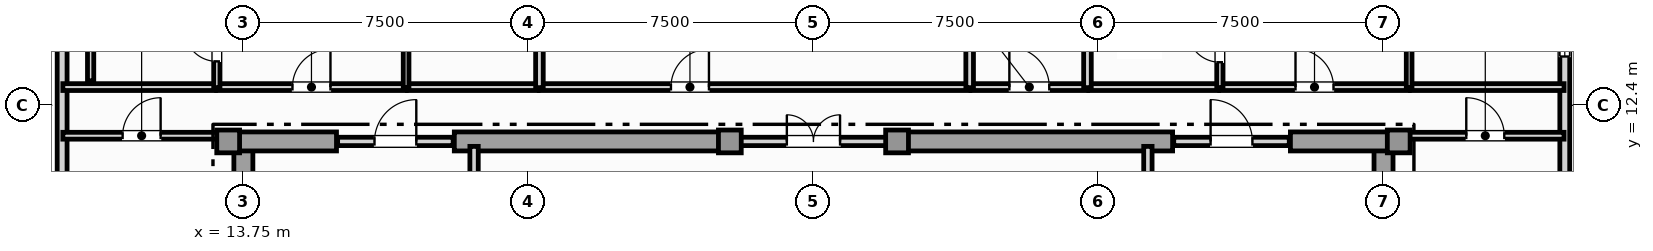
"""IFC4 building model, lengths in metres.
Left out: names, types, materials, properties, quantities, classifications, styles, units other than length and angle.
Written with IfcOpenShell. Run it as: python <this file> out.ifc"""

import sys

from ifc_helpers import new_model, si_unit, direction, frame, frame_2d, origin, origin_2d, place, context, subcontext, project, spatial, rectangle, extrude, element, fill, save


model = new_model("IFC4")
c1 = context("Model", 3, precision=1e-05, world=origin(), true_north=direction((0.0, 1.0)))
c2 = subcontext(c1, "Body", "Model", "MODEL_VIEW")
j1 = project(units=[si_unit("LENGTHUNIT", "METRE"), si_unit("PLANEANGLEUNIT", "RADIAN")], contexts=[c1])
p1 = place(None, origin())
s1 = spatial("IfcSite", under=j1, at=p1, CompositionType="ELEMENT")
p2 = place(p1, origin())
s2 = spatial("IfcBuilding", under=s1, at=p2, CompositionType="ELEMENT")
p3 = place(p2, frame((0.0, 0.0, 308.0)))
s3 = spatial("IfcBuildingStorey", under=s2, at=p3, CompositionType="ELEMENT", Elevation=308.0)
for number, where, z_axis, x_axis in (
    (1, (13.75, 0.92, 0.0), (0.0, 0.0, 1.0), (0.0, 1.0, 0.0)),
    (2, (43.75, 0.92, 0.0), (0.0, 0.0, 1.0), (0.0, 1.0, 0.0)),
):
    element("IfcWall", number, at=place(p3, frame(where, z_axis=z_axis, x_axis=x_axis)), inside=s3, PredefinedType="SHEAR", context=c2, shape_type="SweptSolid", body=[
        extrude(rectangle(XDim=10.53, YDim=0.5, at=frame_2d((5.265, 0.0))), origin(), (0.0, 0.0, 1.0), 4.85),
    ])
p4 = place(p3, frame((13.25, 11.45, 0.0), z_axis=(0.0, 0.0, 1.0), x_axis=(1.0, 0.0, 0.0)))
e3 = element("IfcWall", 3, at=p4, inside=s3, PredefinedType="SHEAR", context=c2, shape_type="SweptSolid", body=[
    extrude(rectangle(XDim=2.95, YDim=0.5, at=frame_2d((1.475, 0.0))), origin(), (0.0, 0.0, 1.0), 4.85),
])
for number, where, z_axis, x_axis in (
    (4, (19.3, 11.45, 0.0), (0.0, 0.0, 1.0), (1.0, 0.0, 0.0)),
    (5, (30.9, 11.45, 0.0), (0.0, 0.0, 1.0), (1.0, 0.0, 0.0)),
):
    element("IfcWall", number, at=place(p3, frame(where, z_axis=z_axis, x_axis=x_axis)), inside=s3, PredefinedType="SHEAR", context=c2, shape_type="SweptSolid", body=[
        extrude(rectangle(XDim=7.3, YDim=0.5, at=frame_2d((3.65, 0.0))), origin(), (0.0, 0.0, 1.0), 4.85),
    ])
p5 = place(p3, frame((41.3, 11.45, 0.0), z_axis=(0.0, 0.0, 1.0), x_axis=(1.0, 0.0, 0.0)))
e6 = element("IfcWall", 6, at=p5, inside=s3, PredefinedType="SHEAR", context=c2, shape_type="SweptSolid", body=[
    extrude(rectangle(XDim=2.95, YDim=0.5, at=frame_2d((1.475, 0.0))), origin(), (0.0, 0.0, 1.0), 4.85),
])
for number, where, z_axis, x_axis in (
    (7, (13.35, 11.45, 0.0), (0.0, 0.0, 1.0), (1.0, 0.0, 0.0)),
    (8, (44.15, 11.45, 0.0), (0.0, 0.0, 1.0), (1.0, 0.0, 0.0)),
    (9, (26.55, 11.45, 0.0), (0.0, 0.0, 1.0), (1.0, 0.0, 0.0)),
    (10, (30.95, 11.45, 0.0), (0.0, 0.0, 1.0), (1.0, 0.0, 0.0)),
):
    element("IfcColumn", number, at=place(p3, frame(where, z_axis=z_axis, x_axis=x_axis)), inside=s3, PredefinedType="COLUMN", context=c2, shape_type="SweptSolid", body=[
        extrude(rectangle(XDim=0.6, YDim=0.6, at=origin_2d()), origin(), (0.0, 0.0, 1.0), 5.05),
    ])
p6 = place(p3, frame((48.519, 3.24, 0.0), z_axis=(0.0, 0.0, 1.0), x_axis=(0.0, 1.0, 0.0)))
e11 = element("IfcWall", 11, at=p6, inside=s3, PredefinedType="SOLIDWALL", context=c2, shape_type="SweptSolid", body=[
    extrude(rectangle(XDim=26.813, YDim=0.26, at=frame_2d((13.406, 0.0))), origin(), (0.0, 0.0, 1.0), 4.85),
])
p7 = place(p6, frame((24.06, 0.0, 0.95)))
e12 = element("IfcOpeningElement", 12, at=p7, cuts=e11, PredefinedType="OPENING", context=c2, shape_type="SweptSolid", body=[
    extrude(rectangle(XDim=0.9, YDim=1.5, at=frame_2d((0.45, 0.75))), frame((0.0, 0.14, 0.0), z_axis=(0.0, -1.0, 0.0), x_axis=(1.0, 0.0, 0.0)), (0.0, 0.0, 1.0), 0.28),
])
p8 = place(p6, frame((10.445, 0.0, 0.9)))
e13 = element("IfcOpeningElement", 13, at=p8, cuts=e11, PredefinedType="OPENING", context=c2, shape_type="SweptSolid", body=[
    extrude(rectangle(XDim=1.5, YDim=1.95, at=frame_2d((0.75, 0.975))), frame((0.0, 0.14, 0.0), z_axis=(0.0, -1.0, 0.0), x_axis=(1.0, 0.0, 0.0)), (0.0, 0.0, 1.0), 0.28),
])
p9 = place(p6, frame((17.51, 0.0, 0.9)))
e14 = element("IfcOpeningElement", 14, at=p9, cuts=e11, PredefinedType="OPENING", context=c2, shape_type="SweptSolid", body=[
    extrude(rectangle(XDim=1.5, YDim=1.95, at=frame_2d((0.75, 0.975))), frame((0.0, 0.14, 0.0), z_axis=(0.0, -1.0, 0.0), x_axis=(1.0, 0.0, 0.0)), (0.0, 0.0, 1.0), 0.28),
])
p10 = place(p3, frame((8.981, 30.053, 0.0), z_axis=(0.0, 0.0, 1.0), x_axis=(0.0, -1.0, 0.0)))
e15 = element("IfcWall", 15, at=p10, inside=s3, PredefinedType="SOLIDWALL", context=c2, shape_type="SweptSolid", body=[
    extrude(rectangle(XDim=26.813, YDim=0.26, at=frame_2d((13.406, 0.0))), origin(), (0.0, 0.0, 1.0), 4.85),
])
p11 = place(p10, frame((20.763, 0.0, 0.85)))
e16 = element("IfcOpeningElement", 16, at=p11, cuts=e15, PredefinedType="OPENING", context=c2, shape_type="SweptSolid", body=[
    extrude(rectangle(XDim=2.4, YDim=2.0, at=frame_2d((1.2, 1.0))), frame((0.0, 0.14, 0.0), z_axis=(0.0, -1.0, 0.0), x_axis=(1.0, 0.0, 0.0)), (0.0, 0.0, 1.0), 0.28),
])
p12 = place(p10, frame((1.853, 0.0, 0.95)))
e17 = element("IfcOpeningElement", 17, at=p12, cuts=e15, PredefinedType="OPENING", context=c2, shape_type="SweptSolid", body=[
    extrude(rectangle(XDim=0.9, YDim=1.5, at=frame_2d((0.45, 0.75))), frame((0.0, 0.14, 0.0), z_axis=(0.0, -1.0, 0.0), x_axis=(1.0, 0.0, 0.0)), (0.0, 0.0, 1.0), 0.28),
])
p13 = place(p10, frame((12.001, 0.0, 0.9)))
e18 = element("IfcOpeningElement", 18, at=p13, cuts=e15, PredefinedType="OPENING", context=c2, shape_type="SweptSolid", body=[
    extrude(rectangle(XDim=1.5, YDim=1.95, at=frame_2d((0.75, 0.975))), frame((0.0, 0.14, 0.0), z_axis=(0.0, -1.0, 0.0), x_axis=(1.0, 0.0, 0.0)), (0.0, 0.0, 1.0), 0.28),
])
p14 = place(p10, frame((6.048, 0.0, 0.9)))
e19 = element("IfcOpeningElement", 19, at=p14, cuts=e15, PredefinedType="OPENING", context=c2, shape_type="SweptSolid", body=[
    extrude(rectangle(XDim=1.5, YDim=1.95, at=frame_2d((0.75, 0.975))), frame((0.0, 0.14, 0.0), z_axis=(0.0, -1.0, 0.0), x_axis=(1.0, 0.0, 0.0)), (0.0, 0.0, 1.0), 0.28),
])
p15 = place(p3, frame((19.82, 8.52, 0.0), z_axis=(0.0, 0.0, 1.0), x_axis=(0.0, 1.0, 0.0)))
e20 = element("IfcWall", 20, at=p15, inside=s3, PredefinedType="SOLIDWALL", context=c2, shape_type="SweptSolid", body=[
    extrude(rectangle(XDim=2.8, YDim=0.22, at=frame_2d((1.4, 0.0))), origin(), (0.0, 0.0, 1.0), 4.305),
])
p16 = place(p15, frame((0.85, 0.0, 0.0)))
e21 = element("IfcOpeningElement", 21, at=p16, cuts=e20, PredefinedType="OPENING", context=c2, shape_type="SweptSolid", body=[
    extrude(rectangle(XDim=1.1, YDim=2.2, at=frame_2d((0.55, 1.1))), frame((0.0, 0.12, 0.0), z_axis=(0.0, -1.0, 0.0), x_axis=(1.0, 0.0, 0.0)), (0.0, 0.0, 1.0), 0.24),
])
p17 = place(p3, frame((37.55, 8.52, 0.0), z_axis=(0.0, 0.0, 1.0), x_axis=(0.0, 1.0, 0.0)))
e22 = element("IfcWall", 22, at=p17, inside=s3, PredefinedType="SOLIDWALL", context=c2, shape_type="SweptSolid", body=[
    extrude(rectangle(XDim=2.8, YDim=0.22, at=frame_2d((1.4, 0.0))), origin(), (0.0, 0.0, 1.0), 4.305),
])
p18 = place(p17, frame((0.85, 0.0, 0.0)))
e23 = element("IfcOpeningElement", 23, at=p18, cuts=e22, PredefinedType="OPENING", context=c2, shape_type="SweptSolid", body=[
    extrude(rectangle(XDim=1.1, YDim=2.2, at=frame_2d((0.55, 1.1))), frame((0.0, 0.12, 0.0), z_axis=(0.0, -1.0, 0.0), x_axis=(1.0, 0.0, 0.0)), (0.0, 0.0, 1.0), 0.24),
])
p19 = place(p3, frame((16.23, 11.45, 0.0), z_axis=(0.0, 0.0, 1.0), x_axis=(1.0, 0.0, 0.0)))
e24 = element("IfcWall", 24, at=p19, inside=s3, PredefinedType="SOLIDWALL", context=c2, shape_type="SweptSolid", body=[
    extrude(rectangle(XDim=3.04, YDim=0.22, at=frame_2d((1.52, 0.0))), origin(), (0.0, 0.0, 1.0), 4.85),
])
p20 = place(p19, frame((0.97, 0.0, 0.0)))
e25 = element("IfcOpeningElement", 25, at=p20, cuts=e24, PredefinedType="OPENING", context=c2, shape_type="SweptSolid", body=[
    extrude(rectangle(XDim=1.1, YDim=2.2, at=frame_2d((0.55, 1.1))), frame((0.0, 0.12, 0.0), z_axis=(0.0, -1.0, 0.0), x_axis=(1.0, 0.0, 0.0)), (0.0, 0.0, 1.0), 0.24),
])
p21 = place(p3, frame((26.63, 11.45, 0.0), z_axis=(0.0, 0.0, 1.0), x_axis=(1.0, 0.0, 0.0)))
e26 = element("IfcWall", 26, at=p21, inside=s3, PredefinedType="SOLIDWALL", context=c2, shape_type="SweptSolid", body=[
    extrude(rectangle(XDim=4.24, YDim=0.22, at=frame_2d((2.12, 0.0))), origin(), (0.0, 0.0, 1.0), 4.85),
])
p22 = place(p21, frame((1.42, 0.0, 0.0)))
e27 = element("IfcOpeningElement", 27, at=p22, cuts=e26, PredefinedType="OPENING", context=c2, shape_type="SweptSolid", body=[
    extrude(rectangle(XDim=1.4, YDim=2.2, at=frame_2d((0.7, 1.1))), frame((0.0, 0.12, 0.0), z_axis=(0.0, -1.0, 0.0), x_axis=(1.0, 0.0, 0.0)), (0.0, 0.0, 1.0), 0.24),
])
p23 = place(p3, frame((38.23, 11.45, 0.0), z_axis=(0.0, 0.0, 1.0), x_axis=(1.0, 0.0, 0.0)))
e28 = element("IfcWall", 28, at=p23, inside=s3, PredefinedType="SOLIDWALL", context=c2, shape_type="SweptSolid", body=[
    extrude(rectangle(XDim=3.04, YDim=0.22, at=frame_2d((1.52, 0.0))), origin(), (0.0, 0.0, 1.0), 4.85),
])
p24 = place(p23, frame((0.97, 0.0, 0.0)))
e29 = element("IfcOpeningElement", 29, at=p24, cuts=e28, PredefinedType="OPENING", context=c2, shape_type="SweptSolid", body=[
    extrude(rectangle(XDim=1.1, YDim=2.2, at=frame_2d((0.55, 1.1))), frame((0.0, 0.12, 0.0), z_axis=(0.0, -1.0, 0.0), x_axis=(1.0, 0.0, 0.0)), (0.0, 0.0, 1.0), 0.24),
])
p25 = place(p3, frame((9.0, 11.6, 0.0), z_axis=(0.0, 0.0, 1.0), x_axis=(1.0, 0.0, 0.0)))
e30 = element("IfcWall", 30, at=p25, inside=s3, PredefinedType="PARTITIONING", context=c2, shape_type="SweptSolid", body=[
    extrude(rectangle(XDim=4.145, YDim=0.18, at=frame_2d((2.072, 0.0))), origin(), (0.0, 0.0, 1.0), 4.85),
])
p26 = place(p25, frame((1.573, 0.0, 0.0)))
e31 = element("IfcOpeningElement", 31, at=p26, cuts=e30, PredefinedType="OPENING", context=c2, shape_type="SweptSolid", body=[
    extrude(rectangle(XDim=1.0, YDim=2.15, at=frame_2d((0.5, 1.075))), frame((0.0, 0.1, 0.0), z_axis=(0.0, -1.0, 0.0), x_axis=(1.0, 0.0, 0.0)), (0.0, 0.0, 1.0), 0.2),
])
p27 = place(p3, frame((44.355, 11.6, 0.0), z_axis=(0.0, 0.0, 1.0), x_axis=(1.0, 0.0, 0.0)))
e32 = element("IfcWall", 32, at=p27, inside=s3, PredefinedType="PARTITIONING", context=c2, shape_type="SweptSolid", body=[
    extrude(rectangle(XDim=4.145, YDim=0.18, at=frame_2d((2.072, 0.0))), origin(), (0.0, 0.0, 1.0), 4.85),
])
p28 = place(p27, frame((1.573, 0.0, 0.0)))
e33 = element("IfcOpeningElement", 33, at=p28, cuts=e32, PredefinedType="OPENING", context=c2, shape_type="SweptSolid", body=[
    extrude(rectangle(XDim=1.0, YDim=2.15, at=frame_2d((0.5, 1.075))), frame((0.0, 0.1, 0.0), z_axis=(0.0, -1.0, 0.0), x_axis=(1.0, 0.0, 0.0)), (0.0, 0.0, 1.0), 0.2),
])
p29 = place(p3, frame((21.535, 12.88, 0.0), z_axis=(0.0, 0.0, 1.0), x_axis=(1.0, 0.0, 0.0)))
e34 = element("IfcWall", 34, at=p29, inside=s3, PredefinedType="PARTITIONING", context=c2, shape_type="SweptSolid", body=[
    extrude(rectangle(XDim=11.33, YDim=0.18, at=frame_2d((5.665, 0.0))), origin(), (0.0, 0.0, 1.0), 4.85),
])
p30 = place(p29, frame((3.466, 0.0, 0.0)))
e35 = element("IfcOpeningElement", 35, at=p30, cuts=e34, PredefinedType="OPENING", context=c2, shape_type="SweptSolid", body=[
    extrude(rectangle(XDim=1.0, YDim=2.15, at=frame_2d((0.5, 1.075))), frame((0.0, 0.1, 0.0), z_axis=(0.0, -1.0, 0.0), x_axis=(1.0, 0.0, 0.0)), (0.0, 0.0, 1.0), 0.2),
])
p31 = place(p3, frame((32.895, 12.88, 0.0), z_axis=(0.0, 0.0, 1.0), x_axis=(1.0, 0.0, 0.0)))
e36 = element("IfcWall", 36, at=p31, inside=s3, PredefinedType="PARTITIONING", context=c2, shape_type="SweptSolid", body=[
    extrude(rectangle(XDim=3.07, YDim=0.18, at=frame_2d((1.535, 0.0))), origin(), (0.0, 0.0, 1.0), 4.85),
])
p32 = place(p31, frame((1.01, 0.0, 0.0)))
e37 = element("IfcOpeningElement", 37, at=p32, cuts=e36, PredefinedType="OPENING", context=c2, shape_type="SweptSolid", body=[
    extrude(rectangle(XDim=1.05, YDim=2.15, at=frame_2d((0.525, 1.075))), frame((0.0, 0.1, 0.0), z_axis=(0.0, -1.0, 0.0), x_axis=(1.0, 0.0, 0.0)), (0.0, 0.0, 1.0), 0.2),
])
p33 = place(p3, frame((13.047, 12.88, 0.0), z_axis=(0.0, 0.0, 1.0), x_axis=(1.0, 0.0, 0.0)))
e38 = element("IfcWall", 38, at=p33, inside=s3, PredefinedType="PARTITIONING", context=c2, shape_type="SweptSolid", body=[
    extrude(rectangle(XDim=4.99, YDim=0.18, at=frame_2d((2.495, 0.0))), origin(), (0.0, 0.0, 1.0), 4.85),
])
p34 = place(p33, frame((1.995, 0.0, 0.0)))
e39 = element("IfcOpeningElement", 39, at=p34, cuts=e38, PredefinedType="OPENING", context=c2, shape_type="SweptSolid", body=[
    extrude(rectangle(XDim=1.0, YDim=2.15, at=frame_2d((0.5, 1.075))), frame((0.0, 0.1, 0.0), z_axis=(0.0, -1.0, 0.0), x_axis=(1.0, 0.0, 0.0)), (0.0, 0.0, 1.0), 0.2),
])
p35 = place(p3, frame((9.0, 12.88, 0.0), z_axis=(0.0, 0.0, 1.0), x_axis=(1.0, 0.0, 0.0)))
e40 = element("IfcWall", 40, at=p35, inside=s3, PredefinedType="PARTITIONING", context=c2, shape_type="SweptSolid", body=[
    extrude(rectangle(XDim=4.016, YDim=0.18, at=frame_2d((2.008, 0.0))), origin(), (0.0, 0.0, 1.0), 4.85),
])
p36 = place(p3, frame((18.067, 12.88, 0.0), z_axis=(0.0, 0.0, 1.0), x_axis=(1.0, 0.0, 0.0)))
e41 = element("IfcWall", 41, at=p36, inside=s3, PredefinedType="PARTITIONING", context=c2, shape_type="SweptSolid", body=[
    extrude(rectangle(XDim=3.438, YDim=0.18, at=frame_2d((1.719, 0.0))), origin(), (0.0, 0.0, 1.0), 4.85),
])
p37 = place(p3, frame((39.439, 12.88, 0.0), z_axis=(0.0, 0.0, 1.0), x_axis=(1.0, 0.0, 0.0)))
e42 = element("IfcWall", 42, at=p37, inside=s3, PredefinedType="PARTITIONING", context=c2, shape_type="SweptSolid", body=[
    extrude(rectangle(XDim=4.99, YDim=0.18, at=frame_2d((2.495, 0.0))), origin(), (0.0, 0.0, 1.0), 4.85),
])
p38 = place(p37, frame((1.995, 0.0, 0.0)))
e43 = element("IfcOpeningElement", 43, at=p38, cuts=e42, PredefinedType="OPENING", context=c2, shape_type="SweptSolid", body=[
    extrude(rectangle(XDim=1.0, YDim=2.15, at=frame_2d((0.5, 1.075))), frame((0.0, 0.1, 0.0), z_axis=(0.0, -1.0, 0.0), x_axis=(1.0, 0.0, 0.0)), (0.0, 0.0, 1.0), 0.2),
])
p39 = place(p3, frame((35.995, 12.88, 0.0), z_axis=(0.0, 0.0, 1.0), x_axis=(1.0, 0.0, 0.0)))
e44 = element("IfcWall", 44, at=p39, inside=s3, PredefinedType="PARTITIONING", context=c2, shape_type="SweptSolid", body=[
    extrude(rectangle(XDim=3.414, YDim=0.18, at=frame_2d((1.707, 0.0))), origin(), (0.0, 0.0, 1.0), 4.85),
])
p40 = place(p3, frame((44.459, 12.88, 0.0), z_axis=(0.0, 0.0, 1.0), x_axis=(1.0, 0.0, 0.0)))
e45 = element("IfcWall", 45, at=p40, inside=s3, PredefinedType="PARTITIONING", context=c2, shape_type="SweptSolid", body=[
    extrude(rectangle(XDim=4.041, YDim=0.18, at=frame_2d((2.021, 0.0))), origin(), (0.0, 0.0, 1.0), 4.85),
])
p41 = place(p3, frame((32.86, 12.865, 0.0), z_axis=(0.0, 0.0, 1.0), x_axis=(0.0, 1.0, 0.0)))
e46 = element("IfcWall", 46, at=p41, inside=s3, PredefinedType="PARTITIONING", context=c2, shape_type="SweptSolid", body=[
    extrude(rectangle(XDim=3.79, YDim=0.2, at=frame_2d((1.895, 0.0))), origin(), (0.0, 0.0, 1.0), 4.85),
])
p42 = place(p3, frame((21.54, 12.865, 0.0), z_axis=(0.0, 0.0, 1.0), x_axis=(0.0, 1.0, 0.0)))
e47 = element("IfcWall", 47, at=p42, inside=s3, PredefinedType="PARTITIONING", context=c2, shape_type="SweptSolid", body=[
    extrude(rectangle(XDim=3.074, YDim=0.2, at=frame_2d((1.537, 0.0))), origin(), (0.0, 0.0, 1.0), 4.85),
])
p43 = place(p3, frame((35.96, 12.865, 0.0), z_axis=(0.0, 0.0, 1.0), x_axis=(0.0, 1.0, 0.0)))
e48 = element("IfcWall", 48, at=p43, inside=s3, PredefinedType="PARTITIONING", context=c2, shape_type="SweptSolid", body=[
    extrude(rectangle(XDim=2.188, YDim=0.2, at=frame_2d((1.094, 0.0))), origin(), (0.0, 0.0, 1.0), 4.85),
])
p44 = place(p3, frame((13.052, 12.865, 0.0), z_axis=(0.0, 0.0, 1.0), x_axis=(0.0, 1.0, 0.0)))
e49 = element("IfcWall", 49, at=p44, inside=s3, PredefinedType="PLUMBINGWALL", context=c2, shape_type="SweptSolid", body=[
    extrude(rectangle(XDim=2.233, YDim=0.165, at=frame_2d((1.116, 0.0))), origin(), (0.0, 0.0, 1.0), 4.85),
])
p45 = place(p44, frame((0.691, 0.0, 0.0)))
e50 = element("IfcOpeningElement", 50, at=p45, cuts=e49, PredefinedType="OPENING", context=c2, shape_type="SweptSolid", body=[
    extrude(rectangle(XDim=0.85, YDim=2.1, at=frame_2d((0.425, 1.05))), frame((0.0, 0.093, 0.0), z_axis=(0.0, -1.0, 0.0), x_axis=(1.0, 0.0, 0.0)), (0.0, 0.0, 1.0), 0.185),
])
p46 = place(p3, frame((18.031, 12.865, 0.0), z_axis=(0.0, 0.0, 1.0), x_axis=(0.0, 1.0, 0.0)))
e51 = element("IfcWall", 51, at=p46, inside=s3, PredefinedType="PARTITIONING", context=c2, shape_type="SweptSolid", body=[
    extrude(rectangle(XDim=3.074, YDim=0.15, at=frame_2d((1.537, 0.0))), origin(), (0.0, 0.0, 1.0), 4.85),
])
p47 = place(p46, frame((1.077, 0.0, 0.0)))
e52 = element("IfcOpeningElement", 52, at=p47, cuts=e51, PredefinedType="OPENING", context=c2, shape_type="SweptSolid", body=[
    extrude(rectangle(XDim=0.92, YDim=2.1, at=frame_2d((0.46, 1.05))), frame((0.0, 0.085, 0.0), z_axis=(0.0, -1.0, 0.0), x_axis=(1.0, 0.0, 0.0)), (0.0, 0.0, 1.0), 0.17),
])
p48 = place(p3, frame((39.444, 12.865, 0.0), z_axis=(0.0, 0.0, 1.0), x_axis=(0.0, 1.0, 0.0)))
e53 = element("IfcWall", 53, at=p48, inside=s3, PredefinedType="PLUMBINGWALL", context=c2, shape_type="SweptSolid", body=[
    extrude(rectangle(XDim=2.188, YDim=0.165, at=frame_2d((1.094, 0.0))), origin(), (0.0, 0.0, 1.0), 4.85),
])
p49 = place(p48, frame((0.669, 0.0, 0.0)))
e54 = element("IfcOpeningElement", 54, at=p49, cuts=e53, PredefinedType="OPENING", context=c2, shape_type="SweptSolid", body=[
    extrude(rectangle(XDim=0.85, YDim=2.1, at=frame_2d((0.425, 1.05))), frame((0.0, 0.093, 0.0), z_axis=(0.0, -1.0, 0.0), x_axis=(1.0, 0.0, 0.0)), (0.0, 0.0, 1.0), 0.185),
])
p50 = place(p3, frame((44.424, 12.865, 0.0), z_axis=(0.0, 0.0, 1.0), x_axis=(0.0, 1.0, 0.0)))
e55 = element("IfcWall", 55, at=p50, inside=s3, PredefinedType="PARTITIONING", context=c2, shape_type="SweptSolid", body=[
    extrude(rectangle(XDim=3.139, YDim=0.15, at=frame_2d((1.57, 0.0))), origin(), (0.0, 0.0, 1.0), 4.85),
])
p51 = place(p50, frame((1.11, 0.0, 0.0)))
e56 = element("IfcOpeningElement", 56, at=p51, cuts=e55, PredefinedType="OPENING", context=c2, shape_type="SweptSolid", body=[
    extrude(rectangle(XDim=0.92, YDim=2.1, at=frame_2d((0.46, 1.05))), frame((0.0, 0.085, 0.0), z_axis=(0.0, -1.0, 0.0), x_axis=(1.0, 0.0, 0.0)), (0.0, 0.0, 1.0), 0.17),
])
p52 = place(p3, frame((9.731, 13.045, 0.0), z_axis=(0.0, 0.0, 1.0), x_axis=(0.0, 1.0, 0.0)))
e57 = element("IfcWall", 57, at=p52, inside=s3, PredefinedType="PLUMBINGWALL", context=c2, shape_type="SweptSolid", body=[
    extrude(rectangle(XDim=1.883, YDim=0.165, at=frame_2d((0.941, 0.0))), origin(), (0.0, 0.0, 1.0), 4.85),
])
p53 = place(p8, origin())
e58 = element("IfcWindow", 58, at=p53, inside=s3, PartitioningType="SINGLE_PANEL", PredefinedType="WINDOW", context=c2, shape_type="SweptSolid", body=[
    extrude(rectangle(XDim=1.5, YDim=1.95, at=frame_2d((0.75, 0.975))), frame((0.0, 0.03, 0.0), z_axis=(0.0, -1.0, 0.0), x_axis=(1.0, 0.0, 0.0)), (0.0, 0.0, 1.0), 0.06),
])
fill(e13, e58)
p54 = place(p20, origin())
e59 = element("IfcDoor", 59, at=p54, inside=s3, OperationType="SINGLE_SWING_RIGHT", PredefinedType="DOOR", context=c2, shape_type="SweptSolid", body=[
    extrude(rectangle(XDim=1.1, YDim=2.2, at=frame_2d((0.55, 1.1))), frame((0.0, 0.025, 0.0), z_axis=(0.0, -1.0, 0.0), x_axis=(1.0, 0.0, 0.0)), (0.0, 0.0, 1.0), 0.05),
])
fill(e25, e59)
p55 = place(p22, origin())
e60 = element("IfcDoor", 60, at=p55, inside=s3, OperationType="DOUBLE_DOOR_SINGLE_SWING", PredefinedType="DOOR", context=c2, shape_type="SweptSolid", body=[
    extrude(rectangle(XDim=1.4, YDim=2.2, at=frame_2d((0.7, 1.1))), frame((0.0, 0.025, 0.0), z_axis=(0.0, -1.0, 0.0), x_axis=(1.0, 0.0, 0.0)), (0.0, 0.0, 1.0), 0.05),
])
fill(e27, e60)
p56 = place(p24, origin())
e61 = element("IfcDoor", 61, at=p56, inside=s3, OperationType="SINGLE_SWING_LEFT", PredefinedType="DOOR", context=c2, shape_type="SweptSolid", body=[
    extrude(rectangle(XDim=1.1, YDim=2.2, at=frame_2d((0.55, 1.1))), frame((0.0, 0.025, 0.0), z_axis=(0.0, -1.0, 0.0), x_axis=(1.0, 0.0, 0.0)), (0.0, 0.0, 1.0), 0.05),
])
fill(e29, e61)
p57 = place(p26, origin())
e62 = element("IfcDoor", 62, at=p57, inside=s3, OperationType="SINGLE_SWING_RIGHT", PredefinedType="DOOR", context=c2, shape_type="SweptSolid", body=[
    extrude(rectangle(XDim=1.0, YDim=2.15, at=frame_2d((0.5, 1.075))), frame((0.0, 0.025, 0.0), z_axis=(0.0, -1.0, 0.0), x_axis=(1.0, 0.0, 0.0)), (0.0, 0.0, 1.0), 0.05),
])
fill(e31, e62)
p58 = place(p28, origin())
e63 = element("IfcDoor", 63, at=p58, inside=s3, OperationType="SINGLE_SWING_LEFT", PredefinedType="DOOR", context=c2, shape_type="SweptSolid", body=[
    extrude(rectangle(XDim=1.0, YDim=2.15, at=frame_2d((0.5, 1.075))), frame((0.0, 0.025, 0.0), z_axis=(0.0, -1.0, 0.0), x_axis=(1.0, 0.0, 0.0)), (0.0, 0.0, 1.0), 0.05),
])
fill(e33, e63)
p59 = place(p30, origin())
e64 = element("IfcDoor", 64, at=p59, inside=s3, OperationType="SINGLE_SWING_RIGHT", PredefinedType="DOOR", context=c2, shape_type="SweptSolid", body=[
    extrude(rectangle(XDim=1.0, YDim=2.15, at=frame_2d((0.5, 1.075))), frame((0.0, 0.025, 0.0), z_axis=(0.0, -1.0, 0.0), x_axis=(1.0, 0.0, 0.0)), (0.0, 0.0, 1.0), 0.05),
])
fill(e35, e64)
p60 = place(p32, origin())
e65 = element("IfcDoor", 65, at=p60, inside=s3, OperationType="SINGLE_SWING_LEFT", PredefinedType="DOOR", context=c2, shape_type="SweptSolid", body=[
    extrude(rectangle(XDim=1.05, YDim=2.15, at=frame_2d((0.525, 1.075))), frame((0.0, 0.025, 0.0), z_axis=(0.0, -1.0, 0.0), x_axis=(1.0, 0.0, 0.0)), (0.0, 0.0, 1.0), 0.05),
])
fill(e37, e65)
p61 = place(p34, origin())
e66 = element("IfcDoor", 66, at=p61, inside=s3, OperationType="SINGLE_SWING_RIGHT", PredefinedType="DOOR", context=c2, shape_type="SweptSolid", body=[
    extrude(rectangle(XDim=1.0, YDim=2.15, at=frame_2d((0.5, 1.075))), frame((0.0, 0.025, 0.0), z_axis=(0.0, -1.0, 0.0), x_axis=(1.0, 0.0, 0.0)), (0.0, 0.0, 1.0), 0.05),
])
fill(e39, e66)
p62 = place(p38, origin())
e67 = element("IfcDoor", 67, at=p62, inside=s3, OperationType="SINGLE_SWING_LEFT", PredefinedType="DOOR", context=c2, shape_type="SweptSolid", body=[
    extrude(rectangle(XDim=1.0, YDim=2.15, at=frame_2d((0.5, 1.075))), frame((0.0, 0.025, 0.0), z_axis=(0.0, -1.0, 0.0), x_axis=(1.0, 0.0, 0.0)), (0.0, 0.0, 1.0), 0.05),
])
fill(e43, e67)
p63 = place(p45, origin())
e68 = element("IfcDoor", 68, at=p63, inside=s3, OperationType="SINGLE_SWING_RIGHT", PredefinedType="DOOR", context=c2, shape_type="SweptSolid", body=[
    extrude(rectangle(XDim=0.85, YDim=2.1, at=frame_2d((0.425, 1.05))), frame((0.0, 0.025, 0.0), z_axis=(0.0, -1.0, 0.0), x_axis=(1.0, 0.0, 0.0)), (0.0, 0.0, 1.0), 0.05),
])
fill(e50, e68)
p64 = place(p49, origin())
e69 = element("IfcDoor", 69, at=p64, inside=s3, OperationType="SINGLE_SWING_RIGHT", PredefinedType="DOOR", context=c2, shape_type="SweptSolid", body=[
    extrude(rectangle(XDim=0.85, YDim=2.1, at=frame_2d((0.425, 1.05))), frame((0.0, 0.025, 0.0), z_axis=(0.0, -1.0, 0.0), x_axis=(1.0, 0.0, 0.0)), (0.0, 0.0, 1.0), 0.05),
])
fill(e54, e69)
save(model, sys.argv[1])
